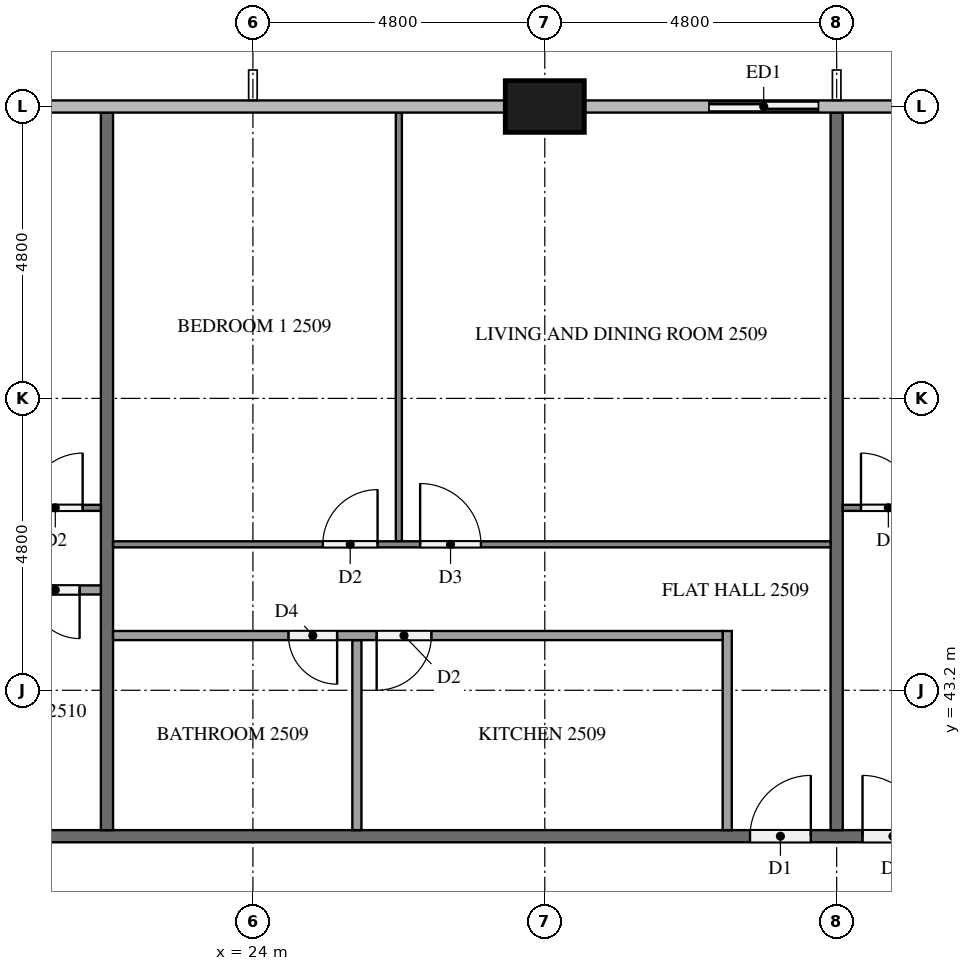
"""IFC4 building model, lengths in metres.
Left out: names, types, materials, properties, quantities, classifications, styles, units other than length and angle.
Written with IfcOpenShell. Run it as: python <this file> out.ifc"""

import sys

from ifc_helpers import new_model, si_unit, direction, frame, frame_2d, origin, origin_2d, place, context, subcontext, project, spatial, rectangle, extrude, element, fill, save


model = new_model("IFC4")
c1 = context("Model", 3, precision=1e-05, world=origin(), true_north=direction((0.0, 1.0)))
c2 = subcontext(c1, "Body", "Model", "MODEL_VIEW")
j1 = project(units=[si_unit("LENGTHUNIT", "METRE"), si_unit("PLANEANGLEUNIT", "RADIAN")], contexts=[c1])
p1 = place(None, origin())
s1 = spatial("IfcSite", under=j1, at=p1, CompositionType="ELEMENT")
p2 = place(p1, origin())
s2 = spatial("IfcBuilding", under=s1, at=p2, CompositionType="ELEMENT")
p3 = place(p2, frame((0.0, 0.0, 99.7)))
s3 = spatial("IfcBuildingStorey", under=s2, at=p3, CompositionType="ELEMENT", Elevation=99.7)
p4 = place(p3, frame((28.8, 52.8, 0.0), z_axis=(0.0, 0.0, 1.0), x_axis=(1.0, 0.0, 0.0)))
e1 = element("IfcColumn", 1, at=p4, inside=s3, PredefinedType="COLUMN", context=c2, shape_type="SweptSolid", body=[
    extrude(rectangle(XDim=1.3, YDim=0.85, at=origin_2d()), origin(), (0.0, 0.0, 1.0), 3.2),
])
p5 = place(p3, frame((33.6, 52.8, 0.0), z_axis=(0.0, 0.0, 1.0), x_axis=(-1.0, 0.0, 0.0)))
e2 = element("IfcWall", 2, at=p5, inside=s3, PredefinedType="SOLIDWALL", context=c2, shape_type="SweptSolid", body=[
    extrude(rectangle(XDim=2.4, YDim=0.15, at=frame_2d((1.2, 0.0))), origin(), (0.0, 0.0, 1.0), 3.2),
])
p6 = place(p5, frame((0.3, 0.0, 0.0)))
e3 = element("IfcOpeningElement", 3, at=p6, cuts=e2, PredefinedType="OPENING", context=c2, shape_type="SweptSolid", body=[
    extrude(rectangle(XDim=1.8, YDim=2.4, at=frame_2d((0.9, 1.2))), frame((0.0, 0.085, 0.0), z_axis=(0.0, -1.0, 0.0), x_axis=(1.0, 0.0, 0.0)), (0.0, 0.0, 1.0), 0.17),
])
p7 = place(p3, frame((11.9, 40.8, 0.0), z_axis=(0.0, 0.0, 1.0), x_axis=(1.0, 0.0, 0.0)))
e4 = element("IfcWall", 4, at=p7, inside=s3, PredefinedType="PARTITIONING", context=c2, shape_type="SweptSolid", body=[
    extrude(rectangle(XDim=38.6, YDim=0.2, at=frame_2d((19.3, 0.0))), origin(), (0.0, 0.0, 1.0), 3.2),
])
p8 = place(p7, frame((22.125, 0.0, 0.0)))
e5 = element("IfcOpeningElement", 5, at=p8, cuts=e4, PredefinedType="OPENING", context=c2, shape_type="SweptSolid", body=[
    extrude(rectangle(XDim=1.0, YDim=2.1, at=frame_2d((0.5, 1.05))), frame((0.0, 0.11, 0.0), z_axis=(0.0, -1.0, 0.0), x_axis=(1.0, 0.0, 0.0)), (0.0, 0.0, 1.0), 0.22),
])
p9 = place(p7, frame((20.275, 0.0, 0.0)))
e6 = element("IfcOpeningElement", 6, at=p9, cuts=e4, PredefinedType="OPENING", context=c2, shape_type="SweptSolid", body=[
    extrude(rectangle(XDim=1.0, YDim=2.1, at=frame_2d((0.5, 1.05))), frame((0.0, 0.11, 0.0), z_axis=(0.0, -1.0, 0.0), x_axis=(1.0, 0.0, 0.0)), (0.0, 0.0, 1.0), 0.22),
])
p10 = place(p7, frame((0.525, 0.0, 0.0)))
e7 = element("IfcOpeningElement", 7, at=p10, cuts=e4, PredefinedType="OPENING", context=c2, shape_type="SweptSolid", body=[
    extrude(rectangle(XDim=1.0, YDim=2.1, at=frame_2d((0.5, 1.05))), frame((0.0, 0.11, 0.0), z_axis=(0.0, -1.0, 0.0), x_axis=(1.0, 0.0, 0.0)), (0.0, 0.0, 1.0), 0.22),
])
for number, where, z_axis, x_axis in (
    (8, (33.6, 52.7, 0.0), (0.0, 0.0, 1.0), (0.0, -1.0, 0.0)),
    (9, (21.6, 52.7, 0.0), (0.0, 0.0, 1.0), (0.0, -1.0, 0.0)),
):
    element("IfcWall", number, at=place(p3, frame(where, z_axis=z_axis, x_axis=x_axis)), inside=s3, PredefinedType="PARTITIONING", context=c2, shape_type="SweptSolid", body=[
        extrude(rectangle(XDim=11.8, YDim=0.2, at=frame_2d((5.9, 0.0))), origin(), (0.0, 0.0, 1.0), 3.2),
    ])
p11 = place(p3, frame((33.7, 46.2, 0.0), z_axis=(0.0, 0.0, 1.0), x_axis=(1.0, 0.0, 0.0)))
e10 = element("IfcWall", 10, at=p11, inside=s3, PredefinedType="PARTITIONING", context=c2, shape_type="SweptSolid", body=[
    extrude(rectangle(XDim=16.6, YDim=0.1, at=frame_2d((8.3, 0.0))), origin(), (0.0, 0.0, 1.0), 3.2),
])
p12 = place(p11, frame((0.3, 0.0, 0.0)))
e11 = element("IfcOpeningElement", 11, at=p12, cuts=e10, PredefinedType="OPENING", context=c2, shape_type="SweptSolid", body=[
    extrude(rectangle(XDim=0.9, YDim=2.1, at=frame_2d((0.45, 1.05))), frame((0.0, 0.06, 0.0), z_axis=(0.0, -1.0, 0.0), x_axis=(1.0, 0.0, 0.0)), (0.0, 0.0, 1.0), 0.12),
])
p13 = place(p11, frame((10.55, 0.0, 0.0)))
e12 = element("IfcOpeningElement", 12, at=p13, cuts=e10, PredefinedType="OPENING", context=c2, shape_type="SweptSolid", body=[
    extrude(rectangle(XDim=1.0, YDim=2.1, at=frame_2d((0.5, 1.05))), frame((0.0, 0.06, 0.0), z_axis=(0.0, -1.0, 0.0), x_axis=(1.0, 0.0, 0.0)), (0.0, 0.0, 1.0), 0.12),
])
p14 = place(p11, frame((12.25, 0.0, 0.0)))
e13 = element("IfcOpeningElement", 13, at=p14, cuts=e10, PredefinedType="OPENING", context=c2, shape_type="SweptSolid", body=[
    extrude(rectangle(XDim=0.9, YDim=2.1, at=frame_2d((0.45, 1.05))), frame((0.0, 0.06, 0.0), z_axis=(0.0, -1.0, 0.0), x_axis=(1.0, 0.0, 0.0)), (0.0, 0.0, 1.0), 0.12),
])
p15 = place(p3, frame((26.4, 45.65, 0.0), z_axis=(0.0, 0.0, 1.0), x_axis=(0.0, 1.0, 0.0)))
e14 = element("IfcWall", 14, at=p15, inside=s3, PredefinedType="PARTITIONING", context=c2, shape_type="SweptSolid", body=[
    extrude(rectangle(XDim=7.05, YDim=0.1, at=frame_2d((3.525, 0.0))), origin(), (0.0, 0.0, 1.0), 3.2),
])
p16 = place(p3, frame((21.7, 45.6, 0.0), z_axis=(0.0, 0.0, 1.0), x_axis=(1.0, 0.0, 0.0)))
e15 = element("IfcWall", 15, at=p16, inside=s3, PredefinedType="PARTITIONING", context=c2, shape_type="SweptSolid", body=[
    extrude(rectangle(XDim=11.8, YDim=0.1, at=frame_2d((5.9, 0.0))), origin(), (0.0, 0.0, 1.0), 3.2),
])
p17 = place(p16, frame((5.05, 0.0, 0.0)))
e16 = element("IfcOpeningElement", 16, at=p17, cuts=e15, PredefinedType="OPENING", context=c2, shape_type="SweptSolid", body=[
    extrude(rectangle(XDim=1.0, YDim=2.1, at=frame_2d((0.5, 1.05))), frame((0.0, 0.06, 0.0), z_axis=(0.0, -1.0, 0.0), x_axis=(1.0, 0.0, 0.0)), (0.0, 0.0, 1.0), 0.12),
])
p18 = place(p16, frame((3.45, 0.0, 0.0)))
e17 = element("IfcOpeningElement", 17, at=p18, cuts=e15, PredefinedType="OPENING", context=c2, shape_type="SweptSolid", body=[
    extrude(rectangle(XDim=0.9, YDim=2.1, at=frame_2d((0.45, 1.05))), frame((0.0, 0.06, 0.0), z_axis=(0.0, -1.0, 0.0), x_axis=(1.0, 0.0, 0.0)), (0.0, 0.0, 1.0), 0.12),
])
p19 = place(p3, frame((25.71, 40.9, 0.0), z_axis=(0.0, 0.0, 1.0), x_axis=(0.0, 1.0, 0.0)))
e18 = element("IfcWall", 18, at=p19, inside=s3, PredefinedType="PARTITIONING", context=c2, shape_type="SweptSolid", body=[
    extrude(rectangle(XDim=3.125, YDim=0.15, at=frame_2d((1.562, 0.0))), origin(), (0.0, 0.0, 1.0), 3.2),
])
p20 = place(p3, frame((31.8, 40.9, 0.0), z_axis=(0.0, 0.0, 1.0), x_axis=(0.0, 1.0, 0.0)))
e19 = element("IfcWall", 19, at=p20, inside=s3, PredefinedType="PARTITIONING", context=c2, shape_type="SweptSolid", body=[
    extrude(rectangle(XDim=3.275, YDim=0.15, at=frame_2d((1.638, 0.0))), origin(), (0.0, 0.0, 1.0), 3.2),
])
p21 = place(p3, frame((31.725, 44.1, 0.0), z_axis=(0.0, 0.0, 1.0), x_axis=(-1.0, 0.0, 0.0)))
e20 = element("IfcWall", 20, at=p21, inside=s3, PredefinedType="PARTITIONING", context=c2, shape_type="SweptSolid", body=[
    extrude(rectangle(XDim=10.025, YDim=0.15, at=frame_2d((5.013, 0.0))), origin(), (0.0, 0.0, 1.0), 3.2),
])
p22 = place(p21, frame((4.79, 0.0, 0.0)))
e21 = element("IfcOpeningElement", 21, at=p22, cuts=e20, PredefinedType="OPENING", context=c2, shape_type="SweptSolid", body=[
    extrude(rectangle(XDim=0.9, YDim=2.1, at=frame_2d((0.45, 1.05))), frame((0.0, 0.085, 0.0), z_axis=(0.0, -1.0, 0.0), x_axis=(1.0, 0.0, 0.0)), (0.0, 0.0, 1.0), 0.17),
])
p23 = place(p21, frame((6.34, 0.0, 0.0)))
e22 = element("IfcOpeningElement", 22, at=p23, cuts=e20, PredefinedType="OPENING", context=c2, shape_type="SweptSolid", body=[
    extrude(rectangle(XDim=0.8, YDim=2.1, at=frame_2d((0.4, 1.05))), frame((0.0, 0.085, 0.0), z_axis=(0.0, -1.0, 0.0), x_axis=(1.0, 0.0, 0.0)), (0.0, 0.0, 1.0), 0.17),
])
p24 = place(p3, frame((12.1, 46.2, 0.0), z_axis=(0.0, 0.0, 1.0), x_axis=(1.0, 0.0, 0.0)))
e23 = element("IfcWall", 23, at=p24, inside=s3, PredefinedType="PARTITIONING", context=c2, shape_type="SweptSolid", body=[
    extrude(rectangle(XDim=9.4, YDim=0.1, at=frame_2d((4.7, 0.0))), origin(), (0.0, 0.0, 1.0), 3.2),
])
p25 = place(p24, frame((0.3, 0.0, 0.0)))
e24 = element("IfcOpeningElement", 24, at=p25, cuts=e23, PredefinedType="OPENING", context=c2, shape_type="SweptSolid", body=[
    extrude(rectangle(XDim=1.0, YDim=2.1, at=frame_2d((0.5, 1.05))), frame((0.0, 0.06, 0.0), z_axis=(0.0, -1.0, 0.0), x_axis=(1.0, 0.0, 0.0)), (0.0, 0.0, 1.0), 0.12),
])
p26 = place(p24, frame((8.2, 0.0, 0.0)))
e25 = element("IfcOpeningElement", 25, at=p26, cuts=e23, PredefinedType="OPENING", context=c2, shape_type="SweptSolid", body=[
    extrude(rectangle(XDim=0.9, YDim=2.1, at=frame_2d((0.45, 1.05))), frame((0.0, 0.06, 0.0), z_axis=(0.0, -1.0, 0.0), x_axis=(1.0, 0.0, 0.0)), (0.0, 0.0, 1.0), 0.12),
])
p27 = place(p3, frame((21.5, 44.85, 0.0), z_axis=(0.0, 0.0, 1.0), x_axis=(-1.0, 0.0, 0.0)))
e26 = element("IfcWall", 26, at=p27, inside=s3, PredefinedType="PARTITIONING", context=c2, shape_type="SweptSolid", body=[
    extrude(rectangle(XDim=7.625, YDim=0.15, at=frame_2d((3.812, 0.0))), origin(), (0.0, 0.0, 1.0), 3.2),
])
p28 = place(p27, frame((6.425, 0.0, 0.0)))
e27 = element("IfcOpeningElement", 27, at=p28, cuts=e26, PredefinedType="OPENING", context=c2, shape_type="SweptSolid", body=[
    extrude(rectangle(XDim=0.9, YDim=2.1, at=frame_2d((0.45, 1.05))), frame((0.0, 0.085, 0.0), z_axis=(0.0, -1.0, 0.0), x_axis=(1.0, 0.0, 0.0)), (0.0, 0.0, 1.0), 0.17),
])
p29 = place(p27, frame((0.35, 0.0, 0.0)))
e28 = element("IfcOpeningElement", 28, at=p29, cuts=e26, PredefinedType="OPENING", context=c2, shape_type="SweptSolid", body=[
    extrude(rectangle(XDim=0.8, YDim=2.1, at=frame_2d((0.4, 1.05))), frame((0.0, 0.085, 0.0), z_axis=(0.0, -1.0, 0.0), x_axis=(1.0, 0.0, 0.0)), (0.0, 0.0, 1.0), 0.17),
])
p30 = place(p6, origin())
e29 = element("IfcDoor", 29, at=p30, inside=s3, OperationType="SLIDING_TO_LEFT", PredefinedType="DOOR", context=c2, shape_type="SweptSolid", body=[
    extrude(rectangle(XDim=1.8, YDim=2.4, at=frame_2d((0.9, 1.2))), frame((0.0, 0.025, 0.0), z_axis=(0.0, -1.0, 0.0), x_axis=(1.0, 0.0, 0.0)), (0.0, 0.0, 1.0), 0.05),
])
fill(e3, e29)
p31 = place(p8, origin())
e30 = element("IfcDoor", 30, at=p31, inside=s3, OperationType="SINGLE_SWING_LEFT", PredefinedType="DOOR", context=c2, shape_type="SweptSolid", body=[
    extrude(rectangle(XDim=1.0, YDim=2.1, at=frame_2d((0.5, 1.05))), frame((0.0, 0.025, 0.0), z_axis=(0.0, -1.0, 0.0), x_axis=(1.0, 0.0, 0.0)), (0.0, 0.0, 1.0), 0.05),
])
fill(e5, e30)
p32 = place(p9, origin())
e31 = element("IfcDoor", 31, at=p32, inside=s3, OperationType="SINGLE_SWING_RIGHT", PredefinedType="DOOR", context=c2, shape_type="SweptSolid", body=[
    extrude(rectangle(XDim=1.0, YDim=2.1, at=frame_2d((0.5, 1.05))), frame((0.0, 0.025, 0.0), z_axis=(0.0, -1.0, 0.0), x_axis=(1.0, 0.0, 0.0)), (0.0, 0.0, 1.0), 0.05),
])
fill(e6, e31)
p33 = place(p12, origin())
e32 = element("IfcDoor", 32, at=p33, inside=s3, OperationType="SINGLE_SWING_LEFT", PredefinedType="DOOR", context=c2, shape_type="SweptSolid", body=[
    extrude(rectangle(XDim=0.9, YDim=2.1, at=frame_2d((0.45, 1.05))), frame((0.0, 0.025, 0.0), z_axis=(0.0, -1.0, 0.0), x_axis=(1.0, 0.0, 0.0)), (0.0, 0.0, 1.0), 0.05),
])
fill(e11, e32)
p34 = place(p17, origin())
e33 = element("IfcDoor", 33, at=p34, inside=s3, OperationType="SINGLE_SWING_LEFT", PredefinedType="DOOR", context=c2, shape_type="SweptSolid", body=[
    extrude(rectangle(XDim=1.0, YDim=2.1, at=frame_2d((0.5, 1.05))), frame((0.0, 0.025, 0.0), z_axis=(0.0, -1.0, 0.0), x_axis=(1.0, 0.0, 0.0)), (0.0, 0.0, 1.0), 0.05),
])
fill(e16, e33)
p35 = place(p18, origin())
e34 = element("IfcDoor", 34, at=p35, inside=s3, OperationType="SINGLE_SWING_RIGHT", PredefinedType="DOOR", context=c2, shape_type="SweptSolid", body=[
    extrude(rectangle(XDim=0.9, YDim=2.1, at=frame_2d((0.45, 1.05))), frame((0.0, 0.025, 0.0), z_axis=(0.0, -1.0, 0.0), x_axis=(1.0, 0.0, 0.0)), (0.0, 0.0, 1.0), 0.05),
])
fill(e17, e34)
p36 = place(p22, origin())
e35 = element("IfcDoor", 35, at=p36, inside=s3, OperationType="SINGLE_SWING_RIGHT", PredefinedType="DOOR", context=c2, shape_type="SweptSolid", body=[
    extrude(rectangle(XDim=0.9, YDim=2.1, at=frame_2d((0.45, 1.05))), frame((0.0, 0.025, 0.0), z_axis=(0.0, -1.0, 0.0), x_axis=(1.0, 0.0, 0.0)), (0.0, 0.0, 1.0), 0.05),
])
fill(e21, e35)
p37 = place(p23, origin())
e36 = element("IfcDoor", 36, at=p37, inside=s3, OperationType="SINGLE_SWING_LEFT", PredefinedType="DOOR", context=c2, shape_type="SweptSolid", body=[
    extrude(rectangle(XDim=0.8, YDim=2.1, at=frame_2d((0.4, 1.05))), frame((0.0, 0.025, 0.0), z_axis=(0.0, -1.0, 0.0), x_axis=(1.0, 0.0, 0.0)), (0.0, 0.0, 1.0), 0.05),
])
fill(e22, e36)
p38 = place(p26, origin())
e37 = element("IfcDoor", 37, at=p38, inside=s3, OperationType="SINGLE_SWING_RIGHT", PredefinedType="DOOR", context=c2, shape_type="SweptSolid", body=[
    extrude(rectangle(XDim=0.9, YDim=2.1, at=frame_2d((0.45, 1.05))), frame((0.0, 0.025, 0.0), z_axis=(0.0, -1.0, 0.0), x_axis=(1.0, 0.0, 0.0)), (0.0, 0.0, 1.0), 0.05),
])
fill(e25, e37)
p39 = place(p29, origin())
e38 = element("IfcDoor", 38, at=p39, inside=s3, OperationType="SINGLE_SWING_LEFT", PredefinedType="DOOR", context=c2, shape_type="SweptSolid", body=[
    extrude(rectangle(XDim=0.8, YDim=2.1, at=frame_2d((0.4, 1.05))), frame((0.0, 0.025, 0.0), z_axis=(0.0, -1.0, 0.0), x_axis=(1.0, 0.0, 0.0)), (0.0, 0.0, 1.0), 0.05),
])
fill(e28, e38)
save(model, sys.argv[1])
